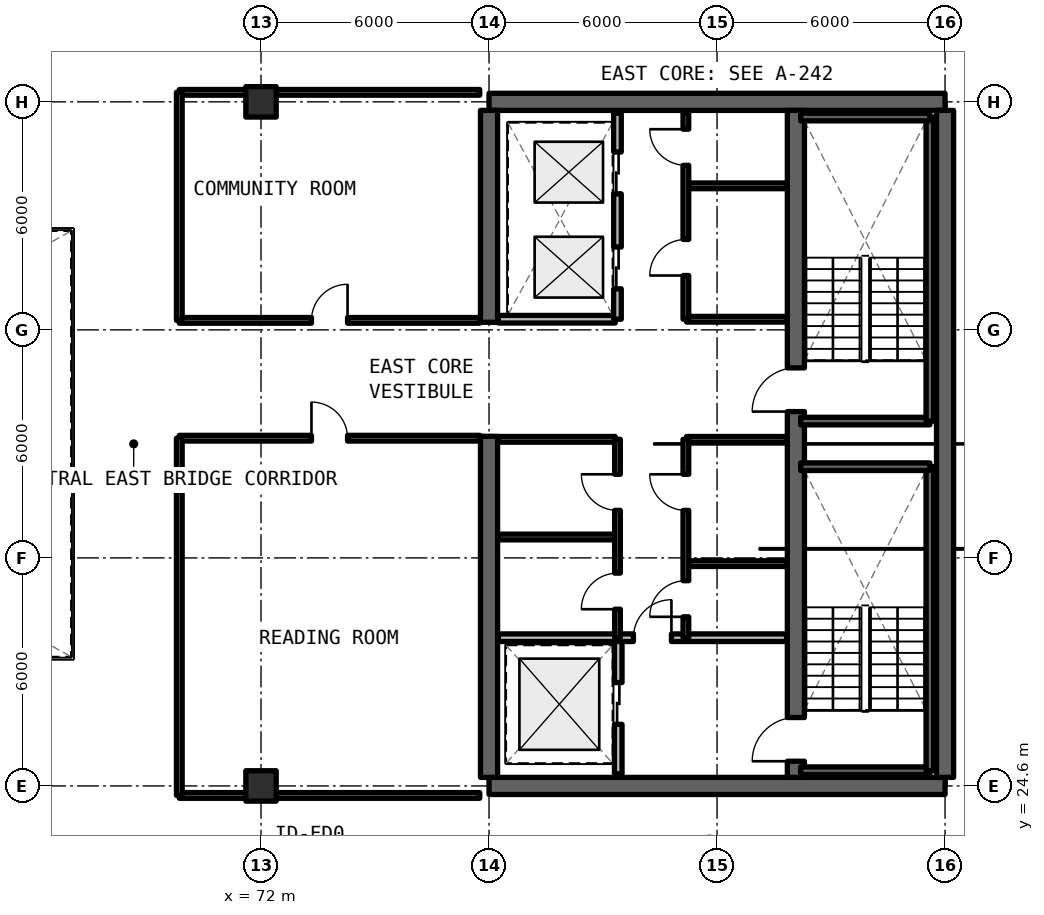
"""IFC4 building model, lengths in metres.
Left out: names, types, materials, properties, quantities, classifications, styles, units other than length and angle.
Written with IfcOpenShell. Run it as: python <this file> out.ifc"""

import sys

from ifc_helpers import new_model, si_unit, direction, frame, frame_2d, origin, origin_2d, place, context, subcontext, project, spatial, rectangle, extrude, element, fill, save


model = new_model("IFC4")
c1 = context("Model", 3, precision=1e-05, world=origin(), true_north=direction((0.0, 1.0)))
c2 = subcontext(c1, "Body", "Model", "MODEL_VIEW")
j1 = project(units=[si_unit("LENGTHUNIT", "METRE"), si_unit("PLANEANGLEUNIT", "RADIAN")], contexts=[c1])
p1 = place(None, origin())
s1 = spatial("IfcSite", under=j1, at=p1, CompositionType="ELEMENT")
p2 = place(p1, origin())
s2 = spatial("IfcBuilding", under=s1, at=p2, CompositionType="ELEMENT")
p3 = place(p2, frame((0.0, 0.0, 181.83)))
s3 = spatial("IfcBuildingStorey", under=s2, at=p3, CompositionType="ELEMENT", Elevation=181.83)
for number, where, z_axis, x_axis in (
    (1, (78.0, 24.6, 0.0), (0.0, 0.0, 1.0), (1.0, 0.0, 0.0)),
    (2, (90.0, 42.6, 0.0), (0.0, 0.0, 1.0), (-1.0, 0.0, 0.0)),
):
    element("IfcWall", number, at=place(p3, frame(where, z_axis=z_axis, x_axis=x_axis)), inside=s3, PredefinedType="SHEAR", context=c2, shape_type="SweptSolid", body=[
        extrude(rectangle(XDim=12.0, YDim=0.45, at=frame_2d((6.0, 0.0))), origin(), (0.0, 0.0, 1.0), 3.3),
    ])
p4 = place(p3, frame((90.0, 24.825, 0.0), z_axis=(0.0, 0.0, 1.0), x_axis=(0.0, 1.0, 0.0)))
e3 = element("IfcWall", 3, at=p4, inside=s3, PredefinedType="SHEAR", context=c2, shape_type="SweptSolid", body=[
    extrude(rectangle(XDim=17.55, YDim=0.45, at=frame_2d((8.775, 0.0))), origin(), (0.0, 0.0, 1.0), 3.3),
])
p5 = place(p3, frame((78.0, 24.825, 0.0), z_axis=(0.0, 0.0, 1.0), x_axis=(0.0, 1.0, 0.0)))
e4 = element("IfcWall", 4, at=p5, inside=s3, PredefinedType="SHEAR", context=c2, shape_type="SweptSolid", body=[
    extrude(rectangle(XDim=8.975, YDim=0.45, at=frame_2d((4.488, 0.0))), origin(), (0.0, 0.0, 1.0), 3.3),
])
p6 = place(p3, frame((78.0, 36.8, 0.0), z_axis=(0.0, 0.0, 1.0), x_axis=(0.0, 1.0, 0.0)))
e5 = element("IfcWall", 5, at=p6, inside=s3, PredefinedType="SHEAR", context=c2, shape_type="SweptSolid", body=[
    extrude(rectangle(XDim=5.575, YDim=0.45, at=frame_2d((2.788, 0.0))), origin(), (0.0, 0.0, 1.0), 3.3),
])
p7 = place(p3, frame((86.075, 24.825, 0.0), z_axis=(0.0, 0.0, 1.0), x_axis=(0.0, 1.0, 0.0)))
e6 = element("IfcWall", 6, at=p7, inside=s3, PredefinedType="SHEAR", context=c2, shape_type="SweptSolid", body=[
    extrude(rectangle(XDim=17.55, YDim=0.45, at=frame_2d((8.775, 0.0))), origin(), (0.0, 0.0, 1.0), 3.3),
])
p8 = place(p7, frame((0.425, 0.0, 0.0)))
e7 = element("IfcOpeningElement", 7, at=p8, cuts=e6, PredefinedType="OPENING", context=c2, shape_type="SweptSolid", body=[
    extrude(rectangle(XDim=1.15, YDim=2.15, at=frame_2d((0.575, 1.075))), frame((0.0, 0.235, 0.0), z_axis=(0.0, -1.0, 0.0), x_axis=(1.0, 0.0, 0.0)), (0.0, 0.0, 1.0), 0.47),
])
p9 = place(p7, frame((9.625, 0.0, 0.0)))
e8 = element("IfcOpeningElement", 8, at=p9, cuts=e6, PredefinedType="OPENING", context=c2, shape_type="SweptSolid", body=[
    extrude(rectangle(XDim=1.15, YDim=2.15, at=frame_2d((0.575, 1.075))), frame((0.0, 0.235, 0.0), z_axis=(0.0, -1.0, 0.0), x_axis=(1.0, 0.0, 0.0)), (0.0, 0.0, 1.0), 0.47),
])
for number, where, z_axis, x_axis in (
    (9, (72.0, 24.6, 0.0), (0.0, 0.0, 1.0), (1.0, 0.0, 0.0)),
    (10, (72.0, 42.6, 0.0), (0.0, 0.0, 1.0), (1.0, 0.0, 0.0)),
):
    element("IfcColumn", number, at=place(p3, frame(where, z_axis=z_axis, x_axis=x_axis)), inside=s3, PredefinedType="COLUMN", context=c2, shape_type="SweptSolid", body=[
        extrude(rectangle(XDim=0.8, YDim=0.8, at=origin_2d()), origin(), (0.0, 0.0, 1.0), 3.3),
    ])
p10 = place(p3, frame((81.4, 24.92, 0.0), z_axis=(0.0, 0.0, 1.0), x_axis=(0.0, 1.0, 0.0)))
e11 = element("IfcWall", 11, at=p10, inside=s3, PredefinedType="SOLIDWALL", context=c2, shape_type="SweptSolid", body=[
    extrude(rectangle(XDim=3.58, YDim=0.2, at=frame_2d((1.79, 0.0))), origin(), (0.0, 0.0, 1.0), 2.35),
])
p11 = place(p10, frame((1.3, 0.0, 0.0)))
e12 = element("IfcOpeningElement", 12, at=p11, cuts=e11, PredefinedType="OPENING", context=c2, shape_type="SweptSolid", body=[
    extrude(rectangle(XDim=1.1, YDim=2.2, at=frame_2d((0.55, 1.1))), frame((0.0, 0.11, 0.0), z_axis=(0.0, -1.0, 0.0), x_axis=(1.0, 0.0, 0.0)), (0.0, 0.0, 1.0), 0.22),
])
p12 = place(p3, frame((78.245, 28.5, 0.0), z_axis=(0.0, 0.0, 1.0), x_axis=(1.0, 0.0, 0.0)))
e13 = element("IfcWall", 13, at=p12, inside=s3, PredefinedType="SOLIDWALL", context=c2, shape_type="SweptSolid", body=[
    extrude(rectangle(XDim=7.585, YDim=0.2, at=frame_2d((3.792, 0.0))), origin(), (0.0, 0.0, 1.0), 2.35),
])
p13 = place(p12, frame((3.555, 0.0, 0.0)))
e14 = element("IfcOpeningElement", 14, at=p13, cuts=e13, PredefinedType="OPENING", context=c2, shape_type="SweptSolid", body=[
    extrude(rectangle(XDim=1.0, YDim=2.15, at=frame_2d((0.5, 1.075))), frame((0.0, 0.11, 0.0), z_axis=(0.0, -1.0, 0.0), x_axis=(1.0, 0.0, 0.0)), (0.0, 0.0, 1.0), 0.22),
])
for number, where, z_axis, x_axis in (
    (15, (83.2, 30.45, 0.0), (0.0, 0.0, 1.0), (1.0, 0.0, 0.0)),
    (16, (83.2, 33.72, 0.0), (0.0, 0.0, 1.0), (1.0, 0.0, 0.0)),
):
    element("IfcWall", number, at=place(p3, frame(where, z_axis=z_axis, x_axis=x_axis)), inside=s3, PredefinedType="SOLIDWALL", context=c2, shape_type="SweptSolid", body=[
        extrude(rectangle(XDim=2.63, YDim=0.15, at=frame_2d((1.315, 0.0))), origin(), (0.0, 0.0, 1.0), 2.35),
    ])
p14 = place(p3, frame((83.18, 28.5, 0.0), z_axis=(0.0, 0.0, 1.0), x_axis=(0.0, 1.0, 0.0)))
e17 = element("IfcWall", 17, at=p14, inside=s3, PredefinedType="SOLIDWALL", context=c2, shape_type="SweptSolid", body=[
    extrude(rectangle(XDim=5.22, YDim=0.15, at=frame_2d((2.61, 0.0))), origin(), (0.0, 0.0, 1.0), 2.35),
])
p15 = place(p14, frame((0.55, 0.0, 0.0)))
e18 = element("IfcOpeningElement", 18, at=p15, cuts=e17, PredefinedType="OPENING", context=c2, shape_type="SweptSolid", body=[
    extrude(rectangle(XDim=0.95, YDim=2.15, at=frame_2d((0.475, 1.075))), frame((0.0, 0.085, 0.0), z_axis=(0.0, -1.0, 0.0), x_axis=(1.0, 0.0, 0.0)), (0.0, 0.0, 1.0), 0.17),
])
p16 = place(p14, frame((3.35, 0.0, 0.0)))
e19 = element("IfcOpeningElement", 19, at=p16, cuts=e17, PredefinedType="OPENING", context=c2, shape_type="SweptSolid", body=[
    extrude(rectangle(XDim=0.95, YDim=2.15, at=frame_2d((0.475, 1.075))), frame((0.0, 0.085, 0.0), z_axis=(0.0, -1.0, 0.0), x_axis=(1.0, 0.0, 0.0)), (0.0, 0.0, 1.0), 0.17),
])
for number, where, z_axis, x_axis in (
    (20, (78.245, 31.15, 0.0), (0.0, 0.0, 1.0), (1.0, 0.0, 0.0)),
    (21, (78.245, 33.72, 0.0), (0.0, 0.0, 1.0), (1.0, 0.0, 0.0)),
):
    element("IfcWall", number, at=place(p3, frame(where, z_axis=z_axis, x_axis=x_axis)), inside=s3, PredefinedType="SOLIDWALL", context=c2, shape_type="SweptSolid", body=[
        extrude(rectangle(XDim=3.075, YDim=0.15, at=frame_2d((1.538, 0.0))), origin(), (0.0, 0.0, 1.0), 2.35),
    ])
p17 = place(p3, frame((81.38, 28.5, 0.0), z_axis=(0.0, 0.0, 1.0), x_axis=(0.0, 1.0, 0.0)))
e22 = element("IfcWall", 22, at=p17, inside=s3, PredefinedType="SOLIDWALL", context=c2, shape_type="SweptSolid", body=[
    extrude(rectangle(XDim=5.22, YDim=0.15, at=frame_2d((2.61, 0.0))), origin(), (0.0, 0.0, 1.0), 2.35),
])
p18 = place(p17, frame((0.75, 0.0, 0.0)))
e23 = element("IfcOpeningElement", 23, at=p18, cuts=e22, PredefinedType="OPENING", context=c2, shape_type="SweptSolid", body=[
    extrude(rectangle(XDim=0.95, YDim=2.15, at=frame_2d((0.475, 1.075))), frame((0.0, 0.085, 0.0), z_axis=(0.0, -1.0, 0.0), x_axis=(1.0, 0.0, 0.0)), (0.0, 0.0, 1.0), 0.17),
])
p19 = place(p17, frame((3.35, 0.0, 0.0)))
e24 = element("IfcOpeningElement", 24, at=p19, cuts=e22, PredefinedType="OPENING", context=c2, shape_type="SweptSolid", body=[
    extrude(rectangle(XDim=0.95, YDim=2.15, at=frame_2d((0.475, 1.075))), frame((0.0, 0.085, 0.0), z_axis=(0.0, -1.0, 0.0), x_axis=(1.0, 0.0, 0.0)), (0.0, 0.0, 1.0), 0.17),
])
for number, where, z_axis, x_axis in (
    (25, (83.2, 36.88, 0.0), (0.0, 0.0, 1.0), (1.0, 0.0, 0.0)),
    (26, (83.2, 40.39, 0.0), (0.0, 0.0, 1.0), (1.0, 0.0, 0.0)),
):
    element("IfcWall", number, at=place(p3, frame(where, z_axis=z_axis, x_axis=x_axis)), inside=s3, PredefinedType="SOLIDWALL", context=c2, shape_type="SweptSolid", body=[
        extrude(rectangle(XDim=2.63, YDim=0.15, at=frame_2d((1.315, 0.0))), origin(), (0.0, 0.0, 1.0), 2.35),
    ])
p20 = place(p3, frame((83.18, 36.88, 0.0), z_axis=(0.0, 0.0, 1.0), x_axis=(0.0, 1.0, 0.0)))
e27 = element("IfcWall", 27, at=p20, inside=s3, PredefinedType="SOLIDWALL", context=c2, shape_type="SweptSolid", body=[
    extrude(rectangle(XDim=5.42, YDim=0.15, at=frame_2d((2.71, 0.0))), origin(), (0.0, 0.0, 1.0), 2.35),
])
p21 = place(p20, frame((1.15, 0.0, 0.0)))
e28 = element("IfcOpeningElement", 28, at=p21, cuts=e27, PredefinedType="OPENING", context=c2, shape_type="SweptSolid", body=[
    extrude(rectangle(XDim=0.95, YDim=2.15, at=frame_2d((0.475, 1.075))), frame((0.0, 0.085, 0.0), z_axis=(0.0, -1.0, 0.0), x_axis=(1.0, 0.0, 0.0)), (0.0, 0.0, 1.0), 0.17),
])
p22 = place(p20, frame((4.05, 0.0, 0.0)))
e29 = element("IfcOpeningElement", 29, at=p22, cuts=e27, PredefinedType="OPENING", context=c2, shape_type="SweptSolid", body=[
    extrude(rectangle(XDim=0.95, YDim=2.15, at=frame_2d((0.475, 1.075))), frame((0.0, 0.085, 0.0), z_axis=(0.0, -1.0, 0.0), x_axis=(1.0, 0.0, 0.0)), (0.0, 0.0, 1.0), 0.17),
])
p23 = place(p3, frame((78.245, 36.88, 0.0), z_axis=(0.0, 0.0, 1.0), x_axis=(1.0, 0.0, 0.0)))
e30 = element("IfcWall", 30, at=p23, inside=s3, PredefinedType="SOLIDWALL", context=c2, shape_type="SweptSolid", body=[
    extrude(rectangle(XDim=3.075, YDim=0.2, at=frame_2d((1.538, 0.0))), origin(), (0.0, 0.0, 1.0), 2.35),
])
p24 = place(p3, frame((81.38, 36.88, 0.0), z_axis=(0.0, 0.0, 1.0), x_axis=(0.0, 1.0, 0.0)))
e31 = element("IfcWall", 31, at=p24, inside=s3, PredefinedType="SOLIDWALL", context=c2, shape_type="SweptSolid", body=[
    extrude(rectangle(XDim=5.42, YDim=0.2, at=frame_2d((2.71, 0.0))), origin(), (0.0, 0.0, 1.0), 2.35),
])
p25 = place(p24, frame((0.8, 0.0, 0.0)))
e32 = element("IfcOpeningElement", 32, at=p25, cuts=e31, PredefinedType="OPENING", context=c2, shape_type="SweptSolid", body=[
    extrude(rectangle(XDim=1.1, YDim=2.2, at=frame_2d((0.55, 1.1))), frame((0.0, 0.11, 0.0), z_axis=(0.0, -1.0, 0.0), x_axis=(1.0, 0.0, 0.0)), (0.0, 0.0, 1.0), 0.22),
])
p26 = place(p24, frame((3.3, 0.0, 0.0)))
e33 = element("IfcOpeningElement", 33, at=p26, cuts=e31, PredefinedType="OPENING", context=c2, shape_type="SweptSolid", body=[
    extrude(rectangle(XDim=1.1, YDim=2.2, at=frame_2d((0.55, 1.1))), frame((0.0, 0.11, 0.0), z_axis=(0.0, -1.0, 0.0), x_axis=(1.0, 0.0, 0.0)), (0.0, 0.0, 1.0), 0.22),
])
p27 = place(p3, frame((69.85, 24.35, 0.0), z_axis=(0.0, 0.0, 1.0), x_axis=(1.0, 0.0, 0.0)))
e34 = element("IfcWall", 34, at=p27, inside=s3, PredefinedType="SOLIDWALL", context=c2, shape_type="SweptSolid", body=[
    extrude(rectangle(XDim=7.905, YDim=0.15, at=frame_2d((3.952, 0.0))), origin(), (0.0, 0.0, 1.0), 2.35),
])
p28 = place(p3, frame((69.85, 33.75, 0.0), z_axis=(0.0, 0.0, 1.0), x_axis=(1.0, 0.0, 0.0)))
e35 = element("IfcWall", 35, at=p28, inside=s3, PredefinedType="SOLIDWALL", context=c2, shape_type="SweptSolid", body=[
    extrude(rectangle(XDim=7.905, YDim=0.15, at=frame_2d((3.952, 0.0))), origin(), (0.0, 0.0, 1.0), 2.35),
])
p29 = place(p28, frame((3.478, 0.0, 0.0)))
e36 = element("IfcOpeningElement", 36, at=p29, cuts=e35, PredefinedType="OPENING", context=c2, shape_type="SweptSolid", body=[
    extrude(rectangle(XDim=0.95, YDim=2.15, at=frame_2d((0.475, 1.075))), frame((0.0, 0.085, 0.0), z_axis=(0.0, -1.0, 0.0), x_axis=(1.0, 0.0, 0.0)), (0.0, 0.0, 1.0), 0.17),
])
p30 = place(p3, frame((69.85, 24.35, 0.0), z_axis=(0.0, 0.0, 1.0), x_axis=(0.0, 1.0, 0.0)))
e37 = element("IfcWall", 37, at=p30, inside=s3, PredefinedType="SOLIDWALL", context=c2, shape_type="SweptSolid", body=[
    extrude(rectangle(XDim=9.4, YDim=0.15, at=frame_2d((4.7, 0.0))), origin(), (0.0, 0.0, 1.0), 2.35),
])
p31 = place(p3, frame((69.85, 36.85, 0.0), z_axis=(0.0, 0.0, 1.0), x_axis=(1.0, 0.0, 0.0)))
e38 = element("IfcWall", 38, at=p31, inside=s3, PredefinedType="SOLIDWALL", context=c2, shape_type="SweptSolid", body=[
    extrude(rectangle(XDim=7.905, YDim=0.15, at=frame_2d((3.952, 0.0))), origin(), (0.0, 0.0, 1.0), 2.35),
])
p32 = place(p31, frame((3.478, 0.0, 0.0)))
e39 = element("IfcOpeningElement", 39, at=p32, cuts=e38, PredefinedType="OPENING", context=c2, shape_type="SweptSolid", body=[
    extrude(rectangle(XDim=0.95, YDim=2.15, at=frame_2d((0.475, 1.075))), frame((0.0, 0.085, 0.0), z_axis=(0.0, -1.0, 0.0), x_axis=(1.0, 0.0, 0.0)), (0.0, 0.0, 1.0), 0.17),
])
p33 = place(p3, frame((69.85, 42.85, 0.0), z_axis=(0.0, 0.0, 1.0), x_axis=(1.0, 0.0, 0.0)))
e40 = element("IfcWall", 40, at=p33, inside=s3, PredefinedType="SOLIDWALL", context=c2, shape_type="SweptSolid", body=[
    extrude(rectangle(XDim=7.905, YDim=0.15, at=frame_2d((3.952, 0.0))), origin(), (0.0, 0.0, 1.0), 2.35),
])
p34 = place(p3, frame((69.85, 36.85, 0.0), z_axis=(0.0, 0.0, 1.0), x_axis=(0.0, 1.0, 0.0)))
e41 = element("IfcWall", 41, at=p34, inside=s3, PredefinedType="SOLIDWALL", context=c2, shape_type="SweptSolid", body=[
    extrude(rectangle(XDim=6.0, YDim=0.15, at=frame_2d((3.0, 0.0))), origin(), (0.0, 0.0, 1.0), 2.35),
])
p35 = place(p3, frame((86.2, 25.0, 0.0), z_axis=(0.0, 0.0, 1.0), x_axis=(1.0, 0.0, 0.0)))
e42 = element("IfcWall", 42, at=p35, inside=s3, PredefinedType="SOLIDWALL", context=c2, shape_type="SweptSolid", body=[
    extrude(rectangle(XDim=3.4, YDim=0.2, at=frame_2d((1.7, 0.0))), origin(), (0.0, 0.0, 1.0), 3.3),
])
p36 = place(p3, frame((89.6, 25.0, 0.0), z_axis=(0.0, 0.0, 1.0), x_axis=(0.0, 1.0, 0.0)))
e43 = element("IfcWall", 43, at=p36, inside=s3, PredefinedType="SOLIDWALL", context=c2, shape_type="SweptSolid", body=[
    extrude(rectangle(XDim=8.0, YDim=0.2, at=frame_2d((4.0, 0.0))), origin(), (0.0, 0.0, 1.0), 3.3),
])
for number, where, z_axis, x_axis in (
    (44, (89.6, 33.0, 0.0), (0.0, 0.0, 1.0), (-1.0, 0.0, 0.0)),
    (45, (86.2, 34.2, 0.0), (0.0, 0.0, 1.0), (1.0, 0.0, 0.0)),
):
    element("IfcWall", number, at=place(p3, frame(where, z_axis=z_axis, x_axis=x_axis)), inside=s3, PredefinedType="SOLIDWALL", context=c2, shape_type="SweptSolid", body=[
        extrude(rectangle(XDim=3.4, YDim=0.2, at=frame_2d((1.7, 0.0))), origin(), (0.0, 0.0, 1.0), 3.3),
    ])
p37 = place(p3, frame((89.6, 34.2, 0.0), z_axis=(0.0, 0.0, 1.0), x_axis=(0.0, 1.0, 0.0)))
e46 = element("IfcWall", 46, at=p37, inside=s3, PredefinedType="SOLIDWALL", context=c2, shape_type="SweptSolid", body=[
    extrude(rectangle(XDim=8.0, YDim=0.2, at=frame_2d((4.0, 0.0))), origin(), (0.0, 0.0, 1.0), 3.3),
])
p38 = place(p3, frame((89.6, 42.2, 0.0), z_axis=(0.0, 0.0, 1.0), x_axis=(-1.0, 0.0, 0.0)))
e47 = element("IfcWall", 47, at=p38, inside=s3, PredefinedType="SOLIDWALL", context=c2, shape_type="SweptSolid", body=[
    extrude(rectangle(XDim=3.4, YDim=0.2, at=frame_2d((1.7, 0.0))), origin(), (0.0, 0.0, 1.0), 3.3),
])
p39 = place(p11, origin())
e48 = element("IfcDoor", 48, at=p39, inside=s3, OperationType="SLIDING_TO_LEFT", PredefinedType="DOOR", context=c2, shape_type="SweptSolid", body=[
    extrude(rectangle(XDim=1.1, YDim=2.2, at=frame_2d((0.55, 1.1))), frame((0.0, 0.025, 0.0), z_axis=(0.0, -1.0, 0.0), x_axis=(1.0, 0.0, 0.0)), (0.0, 0.0, 1.0), 0.05),
])
fill(e12, e48)
p40 = place(p13, origin())
e49 = element("IfcDoor", 49, at=p40, inside=s3, OperationType="SINGLE_SWING_RIGHT", PredefinedType="DOOR", context=c2, shape_type="SweptSolid", body=[
    extrude(rectangle(XDim=1.0, YDim=2.15, at=frame_2d((0.5, 1.075))), frame((0.0, 0.025, 0.0), z_axis=(0.0, -1.0, 0.0), x_axis=(1.0, 0.0, 0.0)), (0.0, 0.0, 1.0), 0.05),
])
fill(e14, e49)
p41 = place(p15, origin())
e50 = element("IfcDoor", 50, at=p41, inside=s3, OperationType="SINGLE_SWING_LEFT", PredefinedType="DOOR", context=c2, shape_type="SweptSolid", body=[
    extrude(rectangle(XDim=0.95, YDim=2.15, at=frame_2d((0.475, 1.075))), frame((0.0, 0.025, 0.0), z_axis=(0.0, -1.0, 0.0), x_axis=(1.0, 0.0, 0.0)), (0.0, 0.0, 1.0), 0.05),
])
fill(e18, e50)
p42 = place(p16, origin())
e51 = element("IfcDoor", 51, at=p42, inside=s3, OperationType="SINGLE_SWING_RIGHT", PredefinedType="DOOR", context=c2, shape_type="SweptSolid", body=[
    extrude(rectangle(XDim=0.95, YDim=2.15, at=frame_2d((0.475, 1.075))), frame((0.0, 0.025, 0.0), z_axis=(0.0, -1.0, 0.0), x_axis=(1.0, 0.0, 0.0)), (0.0, 0.0, 1.0), 0.05),
])
fill(e19, e51)
p43 = place(p18, origin())
e52 = element("IfcDoor", 52, at=p43, inside=s3, OperationType="SINGLE_SWING_LEFT", PredefinedType="DOOR", context=c2, shape_type="SweptSolid", body=[
    extrude(rectangle(XDim=0.95, YDim=2.15, at=frame_2d((0.475, 1.075))), frame((0.0, 0.025, 0.0), z_axis=(0.0, -1.0, 0.0), x_axis=(1.0, 0.0, 0.0)), (0.0, 0.0, 1.0), 0.05),
])
fill(e23, e52)
p44 = place(p19, origin())
e53 = element("IfcDoor", 53, at=p44, inside=s3, OperationType="SINGLE_SWING_RIGHT", PredefinedType="DOOR", context=c2, shape_type="SweptSolid", body=[
    extrude(rectangle(XDim=0.95, YDim=2.15, at=frame_2d((0.475, 1.075))), frame((0.0, 0.025, 0.0), z_axis=(0.0, -1.0, 0.0), x_axis=(1.0, 0.0, 0.0)), (0.0, 0.0, 1.0), 0.05),
])
fill(e24, e53)
p45 = place(p21, origin())
e54 = element("IfcDoor", 54, at=p45, inside=s3, OperationType="SINGLE_SWING_LEFT", PredefinedType="DOOR", context=c2, shape_type="SweptSolid", body=[
    extrude(rectangle(XDim=0.95, YDim=2.15, at=frame_2d((0.475, 1.075))), frame((0.0, 0.025, 0.0), z_axis=(0.0, -1.0, 0.0), x_axis=(1.0, 0.0, 0.0)), (0.0, 0.0, 1.0), 0.05),
])
fill(e28, e54)
p46 = place(p22, origin())
e55 = element("IfcDoor", 55, at=p46, inside=s3, OperationType="SINGLE_SWING_RIGHT", PredefinedType="DOOR", context=c2, shape_type="SweptSolid", body=[
    extrude(rectangle(XDim=0.95, YDim=2.15, at=frame_2d((0.475, 1.075))), frame((0.0, 0.025, 0.0), z_axis=(0.0, -1.0, 0.0), x_axis=(1.0, 0.0, 0.0)), (0.0, 0.0, 1.0), 0.05),
])
fill(e29, e55)
p47 = place(p25, origin())
e56 = element("IfcDoor", 56, at=p47, inside=s3, OperationType="SLIDING_TO_LEFT", PredefinedType="DOOR", context=c2, shape_type="SweptSolid", body=[
    extrude(rectangle(XDim=1.1, YDim=2.2, at=frame_2d((0.55, 1.1))), frame((0.0, 0.025, 0.0), z_axis=(0.0, -1.0, 0.0), x_axis=(1.0, 0.0, 0.0)), (0.0, 0.0, 1.0), 0.05),
])
fill(e32, e56)
p48 = place(p26, origin())
e57 = element("IfcDoor", 57, at=p48, inside=s3, OperationType="SLIDING_TO_RIGHT", PredefinedType="DOOR", context=c2, shape_type="SweptSolid", body=[
    extrude(rectangle(XDim=1.1, YDim=2.2, at=frame_2d((0.55, 1.1))), frame((0.0, 0.025, 0.0), z_axis=(0.0, -1.0, 0.0), x_axis=(1.0, 0.0, 0.0)), (0.0, 0.0, 1.0), 0.05),
])
fill(e33, e57)
p49 = place(p29, origin())
e58 = element("IfcDoor", 58, at=p49, inside=s3, OperationType="SINGLE_SWING_LEFT", PredefinedType="DOOR", context=c2, shape_type="SweptSolid", body=[
    extrude(rectangle(XDim=0.95, YDim=2.15, at=frame_2d((0.475, 1.075))), frame((0.0, 0.025, 0.0), z_axis=(0.0, -1.0, 0.0), x_axis=(1.0, 0.0, 0.0)), (0.0, 0.0, 1.0), 0.05),
])
fill(e36, e58)
p50 = place(p32, origin())
e59 = element("IfcDoor", 59, at=p50, inside=s3, OperationType="SINGLE_SWING_RIGHT", PredefinedType="DOOR", context=c2, shape_type="SweptSolid", body=[
    extrude(rectangle(XDim=0.95, YDim=2.15, at=frame_2d((0.475, 1.075))), frame((0.0, 0.025, 0.0), z_axis=(0.0, -1.0, 0.0), x_axis=(1.0, 0.0, 0.0)), (0.0, 0.0, 1.0), 0.05),
])
fill(e39, e59)
p51 = place(p8, origin())
e60 = element("IfcDoor", 60, at=p51, inside=s3, OperationType="SINGLE_SWING_RIGHT", PredefinedType="DOOR", context=c2, shape_type="SweptSolid", body=[
    extrude(rectangle(XDim=1.15, YDim=2.15, at=frame_2d((0.575, 1.075))), frame((0.0, 0.025, 0.0), z_axis=(0.0, -1.0, 0.0), x_axis=(1.0, 0.0, 0.0)), (0.0, 0.0, 1.0), 0.05),
])
fill(e7, e60)
p52 = place(p9, origin())
e61 = element("IfcDoor", 61, at=p52, inside=s3, OperationType="SINGLE_SWING_LEFT", PredefinedType="DOOR", context=c2, shape_type="SweptSolid", body=[
    extrude(rectangle(XDim=1.15, YDim=2.15, at=frame_2d((0.575, 1.075))), frame((0.0, 0.025, 0.0), z_axis=(0.0, -1.0, 0.0), x_axis=(1.0, 0.0, 0.0)), (0.0, 0.0, 1.0), 0.05),
])
fill(e8, e61)
save(model, sys.argv[1])
